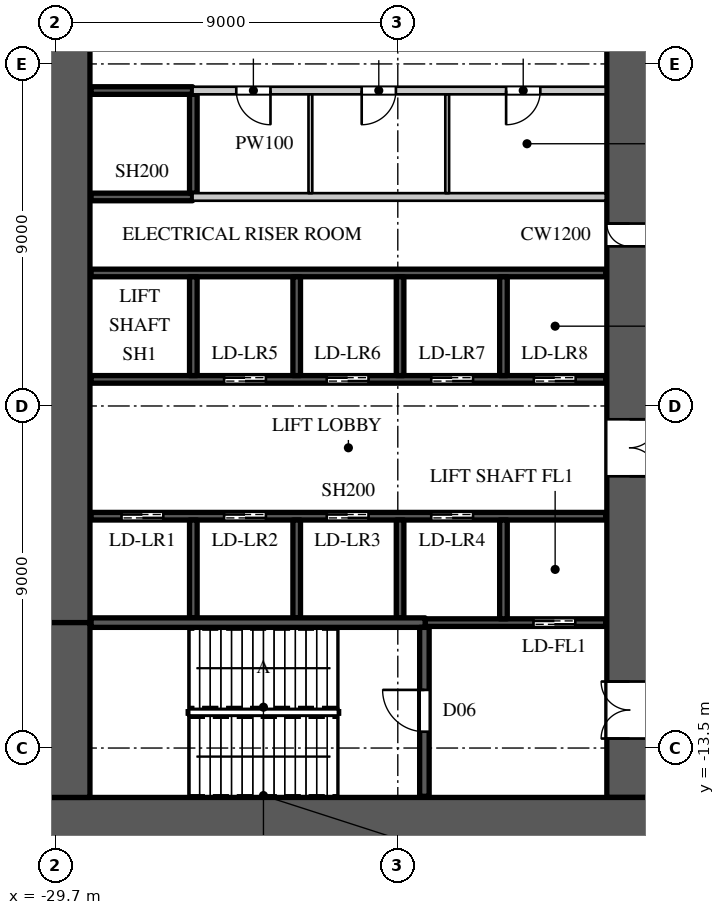
"""IFC4 building model, lengths in metres.
Left out: names, types, materials, properties, quantities, classifications, styles, units other than length and angle.
Written with IfcOpenShell. Run it as: python <this file> out.ifc"""

import sys

from ifc_helpers import new_model, si_unit, direction, frame, frame_2d, origin, place, context, subcontext, project, spatial, rectangle, extrude, element, fill, save


model = new_model("IFC4")
c1 = context("Model", 3, precision=1e-05, world=origin(), true_north=direction((0.0, 1.0)))
c2 = subcontext(c1, "Body", "Model", "MODEL_VIEW")
j1 = project(units=[si_unit("LENGTHUNIT", "METRE"), si_unit("PLANEANGLEUNIT", "RADIAN")], contexts=[c1])
p1 = place(None, origin())
s1 = spatial("IfcSite", under=j1, at=p1, CompositionType="ELEMENT")
p2 = place(p1, origin())
s2 = spatial("IfcBuilding", under=s1, at=p2, CompositionType="ELEMENT")
p3 = place(p2, frame((0.0, 0.0, 19.0)))
s3 = spatial("IfcBuildingStorey", under=s2, at=p3, CompositionType="ELEMENT", Elevation=19.0)
p4 = place(p3, frame((-30.0, -15.4, 0.0), z_axis=(0.0, 0.0, 1.0), x_axis=(1.0, 0.0, 0.0)))
e1 = element("IfcWall", 1, at=p4, inside=s3, PredefinedType="SHEAR", context=c2, shape_type="SweptSolid", body=[
    extrude(rectangle(XDim=16.0, YDim=1.2, at=frame_2d((8.0, 0.0))), origin(), (0.0, 0.0, 1.0), 10.0),
])
p5 = place(p3, frame((-14.6, -14.8, 0.0), z_axis=(0.0, 0.0, 1.0), x_axis=(0.0, 1.0, 0.0)))
e2 = element("IfcWall", 2, at=p5, inside=s3, PredefinedType="SHEAR", context=c2, shape_type="SweptSolid", body=[
    extrude(rectangle(XDim=29.6, YDim=1.2, at=frame_2d((14.8, 0.0))), origin(), (0.0, 0.0, 1.0), 10.0),
])
p6 = place(p5, frame((1.55, 0.0, 0.0)))
e3 = element("IfcOpeningElement", 3, at=p6, cuts=e2, PredefinedType="OPENING", context=c2, shape_type="SweptSolid", body=[
    extrude(rectangle(XDim=1.5, YDim=2.4, at=frame_2d((0.75, 1.2))), frame((0.0, 0.61, 0.0), z_axis=(0.0, -1.0, 0.0), x_axis=(1.0, 0.0, 0.0)), (0.0, 0.0, 1.0), 1.22),
])
p7 = place(p5, frame((26.55, 0.0, 0.0)))
e4 = element("IfcOpeningElement", 4, at=p7, cuts=e2, PredefinedType="OPENING", context=c2, shape_type="SweptSolid", body=[
    extrude(rectangle(XDim=1.5, YDim=2.4, at=frame_2d((0.75, 1.2))), frame((0.0, 0.61, 0.0), z_axis=(0.0, -1.0, 0.0), x_axis=(1.0, 0.0, 0.0)), (0.0, 0.0, 1.0), 1.22),
])
p8 = place(p5, frame((8.45, 0.0, 0.0)))
e5 = element("IfcOpeningElement", 5, at=p8, cuts=e2, PredefinedType="OPENING", context=c2, shape_type="SweptSolid", body=[
    extrude(rectangle(XDim=1.5, YDim=2.4, at=frame_2d((0.75, 1.2))), frame((0.0, 0.61, 0.0), z_axis=(0.0, -1.0, 0.0), x_axis=(1.0, 0.0, 0.0)), (0.0, 0.0, 1.0), 1.22),
])
p9 = place(p5, frame((19.65, 0.0, 0.0)))
e6 = element("IfcOpeningElement", 6, at=p9, cuts=e2, PredefinedType="OPENING", context=c2, shape_type="SweptSolid", body=[
    extrude(rectangle(XDim=1.5, YDim=2.4, at=frame_2d((0.75, 1.2))), frame((0.0, 0.61, 0.0), z_axis=(0.0, -1.0, 0.0), x_axis=(1.0, 0.0, 0.0)), (0.0, 0.0, 1.0), 1.22),
])
p10 = place(p5, frame((14.5, 0.0, 0.0)))
e7 = element("IfcOpeningElement", 7, at=p10, cuts=e2, PredefinedType="OPENING", context=c2, shape_type="SweptSolid", body=[
    extrude(rectangle(XDim=0.6, YDim=2.0, at=frame_2d((0.3, 1.0))), frame((0.0, 0.61, 0.0), z_axis=(0.0, -1.0, 0.0), x_axis=(1.0, 0.0, 0.0)), (0.0, 0.0, 1.0), 1.22),
])
p11 = place(p3, frame((-29.4, -10.2, 0.0), z_axis=(0.0, 0.0, 1.0), x_axis=(0.0, 1.0, 0.0)))
e8 = element("IfcWall", 8, at=p11, inside=s3, PredefinedType="SHEAR", context=c2, shape_type="SweptSolid", body=[
    extrude(rectangle(XDim=20.4, YDim=1.2, at=frame_2d((10.2, 0.0))), origin(), (0.0, 0.0, 1.0), 10.0),
])
p12 = place(p3, frame((-29.4, -14.8, 0.0), z_axis=(0.0, 0.0, 1.0), x_axis=(0.0, 1.0, 0.0)))
e9 = element("IfcWall", 9, at=p12, inside=s3, PredefinedType="SHEAR", context=c2, shape_type="SweptSolid", body=[
    extrude(rectangle(XDim=4.6, YDim=1.2, at=frame_2d((2.3, 0.0))), origin(), (0.0, 0.0, 1.0), 10.0),
])
p13 = place(p3, frame((-26.1, 3.8, 0.0), z_axis=(0.0, 0.0, 1.0), x_axis=(1.0, 0.0, 0.0)))
e10 = element("IfcWall", 10, at=p13, inside=s3, PredefinedType="PARTITIONING", context=c2, shape_type="SweptSolid", body=[
    extrude(rectangle(XDim=10.87, YDim=0.2, at=frame_2d((5.435, 0.0))), origin(), (0.0, 0.0, 1.0), 9.598),
])
p14 = place(p13, frame((1.15, 0.0, 0.0)))
e11 = element("IfcOpeningElement", 11, at=p14, cuts=e10, PredefinedType="OPENING", context=c2, shape_type="SweptSolid", body=[
    extrude(rectangle(XDim=0.9, YDim=2.2, at=frame_2d((0.45, 1.1))), frame((0.0, 0.11, 0.0), z_axis=(0.0, -1.0, 0.0), x_axis=(1.0, 0.0, 0.0)), (0.0, 0.0, 1.0), 0.22),
])
p15 = place(p13, frame((4.45, 0.0, 0.0)))
e12 = element("IfcOpeningElement", 12, at=p15, cuts=e10, PredefinedType="OPENING", context=c2, shape_type="SweptSolid", body=[
    extrude(rectangle(XDim=0.9, YDim=2.2, at=frame_2d((0.45, 1.1))), frame((0.0, 0.11, 0.0), z_axis=(0.0, -1.0, 0.0), x_axis=(1.0, 0.0, 0.0)), (0.0, 0.0, 1.0), 0.22),
])
p16 = place(p13, frame((8.25, 0.0, 0.0)))
e13 = element("IfcOpeningElement", 13, at=p16, cuts=e10, PredefinedType="OPENING", context=c2, shape_type="SweptSolid", body=[
    extrude(rectangle(XDim=0.9, YDim=2.2, at=frame_2d((0.45, 1.1))), frame((0.0, 0.11, 0.0), z_axis=(0.0, -1.0, 0.0), x_axis=(1.0, 0.0, 0.0)), (0.0, 0.0, 1.0), 0.22),
])
p17 = place(p3, frame((-26.1, 1.0, 0.0), z_axis=(0.0, 0.0, 1.0), x_axis=(1.0, 0.0, 0.0)))
e14 = element("IfcWall", 14, at=p17, inside=s3, PredefinedType="PARTITIONING", context=c2, shape_type="SweptSolid", body=[
    extrude(rectangle(XDim=10.87, YDim=0.2, at=frame_2d((5.435, 0.0))), origin(), (0.0, 0.0, 1.0), 9.598),
])
p18 = place(p3, frame((-28.77, -7.4, 0.0), z_axis=(0.0, 0.0, 1.0), x_axis=(1.0, 0.0, 0.0)))
e15 = element("IfcWall", 15, at=p18, inside=s3, PredefinedType="SHEAR", context=c2, shape_type="SweptSolid", body=[
    extrude(rectangle(XDim=13.54, YDim=0.2, at=frame_2d((6.77, 0.0))), origin(), (0.0, 0.0, 1.0), 9.598),
])
p19 = place(p18, frame((0.8, 0.0, 0.0)))
e16 = element("IfcOpeningElement", 16, at=p19, cuts=e15, PredefinedType="OPENING", context=c2, shape_type="SweptSolid", body=[
    extrude(rectangle(XDim=1.1, YDim=2.2, at=frame_2d((0.55, 1.1))), frame((0.0, 0.11, 0.0), z_axis=(0.0, -1.0, 0.0), x_axis=(1.0, 0.0, 0.0)), (0.0, 0.0, 1.0), 0.22),
])
p20 = place(p18, frame((3.5, 0.0, 0.0)))
e17 = element("IfcOpeningElement", 17, at=p20, cuts=e15, PredefinedType="OPENING", context=c2, shape_type="SweptSolid", body=[
    extrude(rectangle(XDim=1.1, YDim=2.2, at=frame_2d((0.55, 1.1))), frame((0.0, 0.11, 0.0), z_axis=(0.0, -1.0, 0.0), x_axis=(1.0, 0.0, 0.0)), (0.0, 0.0, 1.0), 0.22),
])
p21 = place(p18, frame((6.2, 0.0, 0.0)))
e18 = element("IfcOpeningElement", 18, at=p21, cuts=e15, PredefinedType="OPENING", context=c2, shape_type="SweptSolid", body=[
    extrude(rectangle(XDim=1.1, YDim=2.2, at=frame_2d((0.55, 1.1))), frame((0.0, 0.11, 0.0), z_axis=(0.0, -1.0, 0.0), x_axis=(1.0, 0.0, 0.0)), (0.0, 0.0, 1.0), 0.22),
])
p22 = place(p18, frame((8.95, 0.0, 0.0)))
e19 = element("IfcOpeningElement", 19, at=p22, cuts=e15, PredefinedType="OPENING", context=c2, shape_type="SweptSolid", body=[
    extrude(rectangle(XDim=1.1, YDim=2.2, at=frame_2d((0.55, 1.1))), frame((0.0, 0.11, 0.0), z_axis=(0.0, -1.0, 0.0), x_axis=(1.0, 0.0, 0.0)), (0.0, 0.0, 1.0), 0.22),
])
p23 = place(p3, frame((-28.77, -3.8, 0.0), z_axis=(0.0, 0.0, 1.0), x_axis=(1.0, 0.0, 0.0)))
e20 = element("IfcWall", 20, at=p23, inside=s3, PredefinedType="SHEAR", context=c2, shape_type="SweptSolid", body=[
    extrude(rectangle(XDim=13.54, YDim=0.2, at=frame_2d((6.77, 0.0))), origin(), (0.0, 0.0, 1.0), 9.598),
])
p24 = place(p23, frame((3.5, 0.0, 0.0)))
e21 = element("IfcOpeningElement", 21, at=p24, cuts=e20, PredefinedType="OPENING", context=c2, shape_type="SweptSolid", body=[
    extrude(rectangle(XDim=1.1, YDim=2.2, at=frame_2d((0.55, 1.1))), frame((0.0, 0.11, 0.0), z_axis=(0.0, -1.0, 0.0), x_axis=(1.0, 0.0, 0.0)), (0.0, 0.0, 1.0), 0.22),
])
p25 = place(p23, frame((6.2, 0.0, 0.0)))
e22 = element("IfcOpeningElement", 22, at=p25, cuts=e20, PredefinedType="OPENING", context=c2, shape_type="SweptSolid", body=[
    extrude(rectangle(XDim=1.1, YDim=2.2, at=frame_2d((0.55, 1.1))), frame((0.0, 0.11, 0.0), z_axis=(0.0, -1.0, 0.0), x_axis=(1.0, 0.0, 0.0)), (0.0, 0.0, 1.0), 0.22),
])
p26 = place(p23, frame((8.95, 0.0, 0.0)))
e23 = element("IfcOpeningElement", 23, at=p26, cuts=e20, PredefinedType="OPENING", context=c2, shape_type="SweptSolid", body=[
    extrude(rectangle(XDim=1.1, YDim=2.2, at=frame_2d((0.55, 1.1))), frame((0.0, 0.11, 0.0), z_axis=(0.0, -1.0, 0.0), x_axis=(1.0, 0.0, 0.0)), (0.0, 0.0, 1.0), 0.22),
])
p27 = place(p23, frame((11.65, 0.0, 0.0)))
e24 = element("IfcOpeningElement", 24, at=p27, cuts=e20, PredefinedType="OPENING", context=c2, shape_type="SweptSolid", body=[
    extrude(rectangle(XDim=1.1, YDim=2.2, at=frame_2d((0.55, 1.1))), frame((0.0, 0.11, 0.0), z_axis=(0.0, -1.0, 0.0), x_axis=(1.0, 0.0, 0.0)), (0.0, 0.0, 1.0), 0.22),
])
p28 = place(p3, frame((-28.77, -1.0, 0.0), z_axis=(0.0, 0.0, 1.0), x_axis=(1.0, 0.0, 0.0)))
e25 = element("IfcWall", 25, at=p28, inside=s3, PredefinedType="SHEAR", context=c2, shape_type="SweptSolid", body=[
    extrude(rectangle(XDim=13.54, YDim=0.2, at=frame_2d((6.77, 0.0))), origin(), (0.0, 0.0, 1.0), 9.598),
])
for number, where, z_axis, x_axis in (
    (26, (-28.77, 1.0, 0.0), (0.0, 0.0, 1.0), (1.0, 0.0, 0.0)),
    (27, (-28.77, 3.8, 0.0), (0.0, 0.0, 1.0), (1.0, 0.0, 0.0)),
):
    element("IfcWall", number, at=place(p3, frame(where, z_axis=z_axis, x_axis=x_axis)), inside=s3, PredefinedType="SHEAR", context=c2, shape_type="SweptSolid", body=[
        extrude(rectangle(XDim=2.67, YDim=0.2, at=frame_2d((1.335, 0.0))), origin(), (0.0, 0.0, 1.0), 9.598),
    ])
p29 = place(p3, frame((-26.08, -10.075, 0.0), z_axis=(0.0, 0.0, 1.0), x_axis=(0.0, 1.0, 0.0)))
e28 = element("IfcWall", 28, at=p29, inside=s3, PredefinedType="SHEAR", context=c2, shape_type="SweptSolid", body=[
    extrude(rectangle(XDim=2.575, YDim=0.2, at=frame_2d((1.288, 0.0))), origin(), (0.0, 0.0, 1.0), 10.0),
])
p30 = place(p3, frame((-26.08, -3.7, 0.0), z_axis=(0.0, 0.0, 1.0), x_axis=(0.0, 1.0, 0.0)))
e29 = element("IfcWall", 29, at=p30, inside=s3, PredefinedType="SHEAR", context=c2, shape_type="SweptSolid", body=[
    extrude(rectangle(XDim=2.6, YDim=0.2, at=frame_2d((1.3, 0.0))), origin(), (0.0, 0.0, 1.0), 10.0),
])
p31 = place(p3, frame((-26.08, 1.1, 0.0), z_axis=(0.0, 0.0, 1.0), x_axis=(0.0, 1.0, 0.0)))
e30 = element("IfcWall", 30, at=p31, inside=s3, PredefinedType="SHEAR", context=c2, shape_type="SweptSolid", body=[
    extrude(rectangle(XDim=2.6, YDim=0.2, at=frame_2d((1.3, 0.0))), origin(), (0.0, 0.0, 1.0), 9.598),
])
p32 = place(p3, frame((-23.36, -10.075, 0.0), z_axis=(0.0, 0.0, 1.0), x_axis=(0.0, 1.0, 0.0)))
e31 = element("IfcWall", 31, at=p32, inside=s3, PredefinedType="SHEAR", context=c2, shape_type="SweptSolid", body=[
    extrude(rectangle(XDim=2.575, YDim=0.2, at=frame_2d((1.288, 0.0))), origin(), (0.0, 0.0, 1.0), 10.0),
])
p33 = place(p3, frame((-23.36, -3.7, 0.0), z_axis=(0.0, 0.0, 1.0), x_axis=(0.0, 1.0, 0.0)))
e32 = element("IfcWall", 32, at=p33, inside=s3, PredefinedType="SHEAR", context=c2, shape_type="SweptSolid", body=[
    extrude(rectangle(XDim=2.6, YDim=0.2, at=frame_2d((1.3, 0.0))), origin(), (0.0, 0.0, 1.0), 10.0),
])
p34 = place(p3, frame((-20.64, -10.075, 0.0), z_axis=(0.0, 0.0, 1.0), x_axis=(0.0, 1.0, 0.0)))
e33 = element("IfcWall", 33, at=p34, inside=s3, PredefinedType="SHEAR", context=c2, shape_type="SweptSolid", body=[
    extrude(rectangle(XDim=2.575, YDim=0.2, at=frame_2d((1.288, 0.0))), origin(), (0.0, 0.0, 1.0), 10.0),
])
p35 = place(p3, frame((-20.64, -3.7, 0.0), z_axis=(0.0, 0.0, 1.0), x_axis=(0.0, 1.0, 0.0)))
e34 = element("IfcWall", 34, at=p35, inside=s3, PredefinedType="SHEAR", context=c2, shape_type="SweptSolid", body=[
    extrude(rectangle(XDim=2.6, YDim=0.2, at=frame_2d((1.3, 0.0))), origin(), (0.0, 0.0, 1.0), 10.0),
])
p36 = place(p3, frame((-19.98, -10.2, 0.0), z_axis=(0.0, 0.0, 1.0), x_axis=(1.0, 0.0, 0.0)))
e35 = element("IfcWall", 35, at=p36, inside=s3, PredefinedType="SHEAR", context=c2, shape_type="SweptSolid", body=[
    extrude(rectangle(XDim=4.75, YDim=0.2, at=frame_2d((2.375, 0.0))), origin(), (0.0, 0.0, 1.0), 9.598),
])
p37 = place(p36, frame((2.85, 0.0, 0.0)))
e36 = element("IfcOpeningElement", 36, at=p37, cuts=e35, PredefinedType="OPENING", context=c2, shape_type="SweptSolid", body=[
    extrude(rectangle(XDim=1.1, YDim=2.2, at=frame_2d((0.55, 1.1))), frame((0.0, 0.11, 0.0), z_axis=(0.0, -1.0, 0.0), x_axis=(1.0, 0.0, 0.0)), (0.0, 0.0, 1.0), 0.22),
])
p38 = place(p3, frame((-17.92, -10.1, 0.0), z_axis=(0.0, 0.0, 1.0), x_axis=(0.0, 1.0, 0.0)))
e37 = element("IfcWall", 37, at=p38, inside=s3, PredefinedType="SHEAR", context=c2, shape_type="SweptSolid", body=[
    extrude(rectangle(XDim=2.6, YDim=0.2, at=frame_2d((1.3, 0.0))), origin(), (0.0, 0.0, 1.0), 10.0),
])
p39 = place(p3, frame((-17.92, -3.7, 0.0), z_axis=(0.0, 0.0, 1.0), x_axis=(0.0, 1.0, 0.0)))
e38 = element("IfcWall", 38, at=p39, inside=s3, PredefinedType="SHEAR", context=c2, shape_type="SweptSolid", body=[
    extrude(rectangle(XDim=2.6, YDim=0.2, at=frame_2d((1.3, 0.0))), origin(), (0.0, 0.0, 1.0), 10.0),
])
p40 = place(p3, frame((-28.77, -10.2, 0.0), z_axis=(0.0, 0.0, 1.0), x_axis=(1.0, 0.0, 0.0)))
e39 = element("IfcWall", 39, at=p40, inside=s3, PredefinedType="SHEAR", context=c2, shape_type="SweptSolid", body=[
    extrude(rectangle(XDim=8.79, YDim=0.25, at=frame_2d((4.395, 0.0))), origin(), (0.0, 0.0, 1.0), 9.598),
])
p41 = place(p3, frame((-20.0, -14.77, 0.0), z_axis=(0.0, 0.0, 1.0), x_axis=(0.0, 1.0, 0.0)))
e40 = element("IfcWall", 40, at=p41, inside=s3, PredefinedType="SHEAR", context=c2, shape_type="SweptSolid", body=[
    extrude(rectangle(XDim=4.445, YDim=0.25, at=frame_2d((2.223, 0.0))), origin(), (0.0, 0.0, 1.0), 9.598),
])
p42 = place(p41, frame((1.7, 0.0, 0.0)))
e41 = element("IfcOpeningElement", 41, at=p42, cuts=e40, PredefinedType="OPENING", context=c2, shape_type="SweptSolid", body=[
    extrude(rectangle(XDim=1.1, YDim=2.2, at=frame_2d((0.55, 1.1))), frame((0.0, 0.135, 0.0), z_axis=(0.0, -1.0, 0.0), x_axis=(1.0, 0.0, 0.0)), (0.0, 0.0, 1.0), 0.27),
])
for number, where, z_axis, x_axis in (
    (42, (-23.0, 1.1, 0.0), (0.0, 0.0, 1.0), (0.0, 1.0, 0.0)),
    (43, (-19.4, 1.1, 0.0), (0.0, 0.0, 1.0), (0.0, 1.0, 0.0)),
):
    element("IfcWall", number, at=place(p3, frame(where, z_axis=z_axis, x_axis=x_axis)), inside=s3, PredefinedType="PARTITIONING", context=c2, shape_type="SweptSolid", body=[
        extrude(rectangle(XDim=2.6, YDim=0.1, at=frame_2d((1.3, 0.0))), origin(), (0.0, 0.0, 1.0), 9.598),
    ])
p43 = place(p42, origin())
e44 = element("IfcDoor", 44, at=p43, inside=s3, OperationType="SINGLE_SWING_RIGHT", PredefinedType="DOOR", context=c2, shape_type="SweptSolid", body=[
    extrude(rectangle(XDim=1.1, YDim=2.2, at=frame_2d((0.55, 1.1))), frame((0.0, 0.025, 0.0), z_axis=(0.0, -1.0, 0.0), x_axis=(1.0, 0.0, 0.0)), (0.0, 0.0, 1.0), 0.05),
])
fill(e41, e44)
p44 = place(p14, origin())
e45 = element("IfcDoor", 45, at=p44, inside=s3, OperationType="SINGLE_SWING_LEFT", PredefinedType="DOOR", context=c2, shape_type="SweptSolid", body=[
    extrude(rectangle(XDim=0.9, YDim=2.2, at=frame_2d((0.45, 1.1))), frame((0.0, 0.025, 0.0), z_axis=(0.0, -1.0, 0.0), x_axis=(1.0, 0.0, 0.0)), (0.0, 0.0, 1.0), 0.05),
])
fill(e11, e45)
p45 = place(p15, origin())
e46 = element("IfcDoor", 46, at=p45, inside=s3, OperationType="SINGLE_SWING_RIGHT", PredefinedType="DOOR", context=c2, shape_type="SweptSolid", body=[
    extrude(rectangle(XDim=0.9, YDim=2.2, at=frame_2d((0.45, 1.1))), frame((0.0, 0.025, 0.0), z_axis=(0.0, -1.0, 0.0), x_axis=(1.0, 0.0, 0.0)), (0.0, 0.0, 1.0), 0.05),
])
fill(e12, e46)
p46 = place(p16, origin())
e47 = element("IfcDoor", 47, at=p46, inside=s3, OperationType="SINGLE_SWING_RIGHT", PredefinedType="DOOR", context=c2, shape_type="SweptSolid", body=[
    extrude(rectangle(XDim=0.9, YDim=2.2, at=frame_2d((0.45, 1.1))), frame((0.0, 0.025, 0.0), z_axis=(0.0, -1.0, 0.0), x_axis=(1.0, 0.0, 0.0)), (0.0, 0.0, 1.0), 0.05),
])
fill(e13, e47)
p47 = place(p19, origin())
e48 = element("IfcDoor", 48, at=p47, inside=s3, OperationType="DOUBLE_DOOR_SLIDING", PredefinedType="DOOR", context=c2, shape_type="SweptSolid", body=[
    extrude(rectangle(XDim=1.1, YDim=2.2, at=frame_2d((0.55, 1.1))), frame((0.0, 0.025, 0.0), z_axis=(0.0, -1.0, 0.0), x_axis=(1.0, 0.0, 0.0)), (0.0, 0.0, 1.0), 0.05),
])
fill(e16, e48)
p48 = place(p20, origin())
e49 = element("IfcDoor", 49, at=p48, inside=s3, OperationType="DOUBLE_DOOR_SLIDING", PredefinedType="DOOR", context=c2, shape_type="SweptSolid", body=[
    extrude(rectangle(XDim=1.1, YDim=2.2, at=frame_2d((0.55, 1.1))), frame((0.0, 0.025, 0.0), z_axis=(0.0, -1.0, 0.0), x_axis=(1.0, 0.0, 0.0)), (0.0, 0.0, 1.0), 0.05),
])
fill(e17, e49)
p49 = place(p21, origin())
e50 = element("IfcDoor", 50, at=p49, inside=s3, OperationType="DOUBLE_DOOR_SLIDING", PredefinedType="DOOR", context=c2, shape_type="SweptSolid", body=[
    extrude(rectangle(XDim=1.1, YDim=2.2, at=frame_2d((0.55, 1.1))), frame((0.0, 0.025, 0.0), z_axis=(0.0, -1.0, 0.0), x_axis=(1.0, 0.0, 0.0)), (0.0, 0.0, 1.0), 0.05),
])
fill(e18, e50)
p50 = place(p22, origin())
e51 = element("IfcDoor", 51, at=p50, inside=s3, OperationType="DOUBLE_DOOR_SLIDING", PredefinedType="DOOR", context=c2, shape_type="SweptSolid", body=[
    extrude(rectangle(XDim=1.1, YDim=2.2, at=frame_2d((0.55, 1.1))), frame((0.0, 0.025, 0.0), z_axis=(0.0, -1.0, 0.0), x_axis=(1.0, 0.0, 0.0)), (0.0, 0.0, 1.0), 0.05),
])
fill(e19, e51)
p51 = place(p37, origin())
e52 = element("IfcDoor", 52, at=p51, inside=s3, OperationType="DOUBLE_DOOR_SLIDING", PredefinedType="DOOR", context=c2, shape_type="SweptSolid", body=[
    extrude(rectangle(XDim=1.1, YDim=2.2, at=frame_2d((0.55, 1.1))), frame((0.0, 0.025, 0.0), z_axis=(0.0, -1.0, 0.0), x_axis=(1.0, 0.0, 0.0)), (0.0, 0.0, 1.0), 0.05),
])
fill(e36, e52)
p52 = place(p24, origin())
e53 = element("IfcDoor", 53, at=p52, inside=s3, OperationType="DOUBLE_DOOR_SLIDING", PredefinedType="DOOR", context=c2, shape_type="SweptSolid", body=[
    extrude(rectangle(XDim=1.1, YDim=2.2, at=frame_2d((0.55, 1.1))), frame((0.0, 0.025, 0.0), z_axis=(0.0, -1.0, 0.0), x_axis=(1.0, 0.0, 0.0)), (0.0, 0.0, 1.0), 0.05),
])
fill(e21, e53)
p53 = place(p25, origin())
e54 = element("IfcDoor", 54, at=p53, inside=s3, OperationType="DOUBLE_DOOR_SLIDING", PredefinedType="DOOR", context=c2, shape_type="SweptSolid", body=[
    extrude(rectangle(XDim=1.1, YDim=2.2, at=frame_2d((0.55, 1.1))), frame((0.0, 0.025, 0.0), z_axis=(0.0, -1.0, 0.0), x_axis=(1.0, 0.0, 0.0)), (0.0, 0.0, 1.0), 0.05),
])
fill(e22, e54)
p54 = place(p26, origin())
e55 = element("IfcDoor", 55, at=p54, inside=s3, OperationType="DOUBLE_DOOR_SLIDING", PredefinedType="DOOR", context=c2, shape_type="SweptSolid", body=[
    extrude(rectangle(XDim=1.1, YDim=2.2, at=frame_2d((0.55, 1.1))), frame((0.0, 0.025, 0.0), z_axis=(0.0, -1.0, 0.0), x_axis=(1.0, 0.0, 0.0)), (0.0, 0.0, 1.0), 0.05),
])
fill(e23, e55)
p55 = place(p27, origin())
e56 = element("IfcDoor", 56, at=p55, inside=s3, OperationType="DOUBLE_DOOR_SLIDING", PredefinedType="DOOR", context=c2, shape_type="SweptSolid", body=[
    extrude(rectangle(XDim=1.1, YDim=2.2, at=frame_2d((0.55, 1.1))), frame((0.0, 0.025, 0.0), z_axis=(0.0, -1.0, 0.0), x_axis=(1.0, 0.0, 0.0)), (0.0, 0.0, 1.0), 0.05),
])
fill(e24, e56)
p56 = place(p6, origin())
e57 = element("IfcDoor", 57, at=p56, inside=s3, OperationType="DOUBLE_DOOR_SINGLE_SWING", PredefinedType="DOOR", context=c2, shape_type="SweptSolid", body=[
    extrude(rectangle(XDim=1.5, YDim=2.4, at=frame_2d((0.75, 1.2))), frame((0.0, 0.025, 0.0), z_axis=(0.0, -1.0, 0.0), x_axis=(1.0, 0.0, 0.0)), (0.0, 0.0, 1.0), 0.05),
])
fill(e3, e57)
p57 = place(p8, origin())
e58 = element("IfcDoor", 58, at=p57, inside=s3, OperationType="DOUBLE_DOOR_SINGLE_SWING", PredefinedType="DOOR", context=c2, shape_type="SweptSolid", body=[
    extrude(rectangle(XDim=1.5, YDim=2.4, at=frame_2d((0.75, 1.2))), frame((0.0, 0.025, 0.0), z_axis=(0.0, -1.0, 0.0), x_axis=(1.0, 0.0, 0.0)), (0.0, 0.0, 1.0), 0.05),
])
fill(e5, e58)
p58 = place(p10, origin())
e59 = element("IfcDoor", 59, at=p58, inside=s3, OperationType="SINGLE_SWING_RIGHT", PredefinedType="DOOR", context=c2, shape_type="SweptSolid", body=[
    extrude(rectangle(XDim=0.6, YDim=2.0, at=frame_2d((0.3, 1.0))), frame((0.0, 0.025, 0.0), z_axis=(0.0, -1.0, 0.0), x_axis=(1.0, 0.0, 0.0)), (0.0, 0.0, 1.0), 0.05),
])
fill(e7, e59)
save(model, sys.argv[1])
